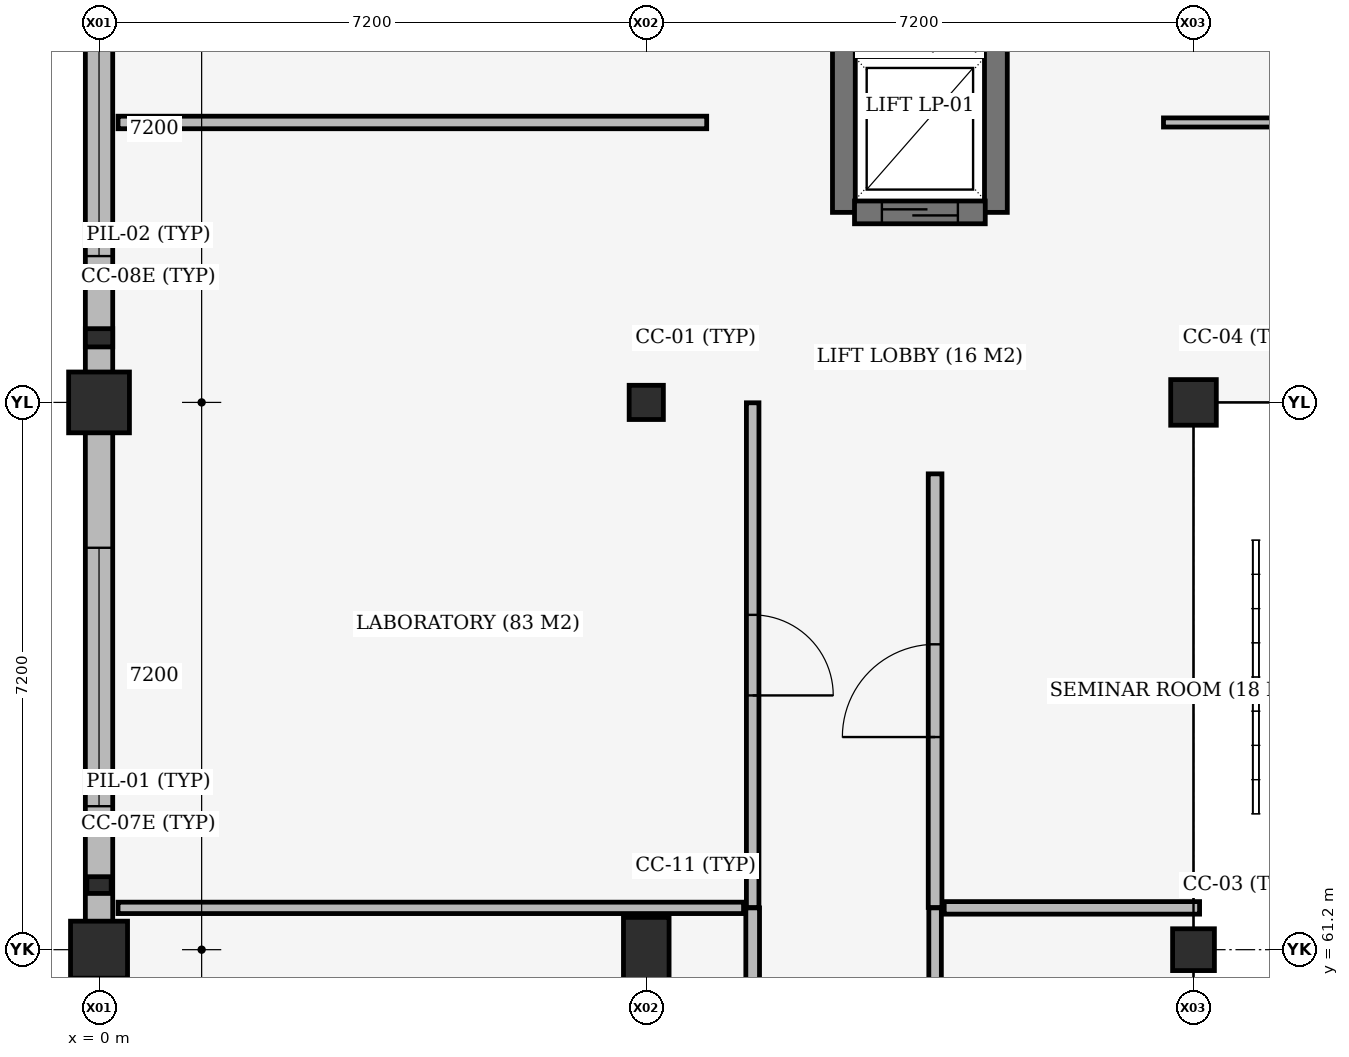
"""IFC4 building model, lengths in metres.
Left out: names, types, materials, properties, quantities, classifications, styles, units other than length and angle.
Written with IfcOpenShell. Run it as: python <this file> out.ifc"""

import sys

from ifc_helpers import new_model, si_unit, direction, frame, frame_2d, origin, origin_2d, place, context, subcontext, project, spatial, rectangle, extrude, element, fill, save


model = new_model("IFC4")
c1 = context("Model", 3, precision=1e-05, world=origin(), true_north=direction((0.0, 1.0)))
c2 = subcontext(c1, "Body", "Model", "MODEL_VIEW")
j1 = project(units=[si_unit("LENGTHUNIT", "METRE"), si_unit("PLANEANGLEUNIT", "RADIAN")], contexts=[c1])
p1 = place(None, origin())
s1 = spatial("IfcSite", under=j1, at=p1, CompositionType="ELEMENT")
p2 = place(p1, origin())
s2 = spatial("IfcBuilding", under=s1, at=p2, CompositionType="ELEMENT")
p3 = place(p2, frame((0.0, 0.0, 5.4)))
s3 = spatial("IfcBuildingStorey", under=s2, at=p3, CompositionType="ELEMENT", Elevation=5.4)
p4 = place(p3, frame((0.0, 61.2, 0.0), z_axis=(0.0, 0.0, 1.0), x_axis=(1.0, 0.0, 0.0)))
e1 = element("IfcColumn", 1, at=p4, inside=s3, PredefinedType="COLUMN", context=c2, shape_type="SweptSolid", body=[
    extrude(rectangle(XDim=0.75, YDim=0.75, at=origin_2d()), origin(), (0.0, 0.0, 1.0), 3.89),
])
p5 = place(p3, frame((0.0, 68.4, 0.0), z_axis=(0.0, 0.0, 1.0), x_axis=(1.0, 0.0, 0.0)))
e2 = element("IfcColumn", 2, at=p5, inside=s3, PredefinedType="COLUMN", context=c2, shape_type="SweptSolid", body=[
    extrude(rectangle(XDim=0.8, YDim=0.8, at=origin_2d()), origin(), (0.0, 0.0, 1.0), 3.89),
])
p6 = place(p3, frame((7.2, 61.2, 0.0), z_axis=(0.0, 0.0, 1.0), x_axis=(1.0, 0.0, 0.0)))
e3 = element("IfcColumn", 3, at=p6, inside=s3, PredefinedType="COLUMN", context=c2, shape_type="SweptSolid", body=[
    extrude(rectangle(XDim=0.6, YDim=0.85, at=origin_2d()), origin(), (0.0, 0.0, 1.0), 3.89),
])
p7 = place(p3, frame((7.2, 68.4, 0.0), z_axis=(0.0, 0.0, 1.0), x_axis=(1.0, 0.0, 0.0)))
e4 = element("IfcColumn", 4, at=p7, inside=s3, PredefinedType="COLUMN", context=c2, shape_type="SweptSolid", body=[
    extrude(rectangle(XDim=0.45, YDim=0.45, at=origin_2d()), origin(), (0.0, 0.0, 1.0), 3.89),
])
p8 = place(p3, frame((14.4, 61.2, 0.0), z_axis=(0.0, 0.0, 1.0), x_axis=(1.0, 0.0, 0.0)))
e5 = element("IfcColumn", 5, at=p8, inside=s3, PredefinedType="COLUMN", context=c2, shape_type="SweptSolid", body=[
    extrude(rectangle(XDim=0.55, YDim=0.55, at=origin_2d()), origin(), (0.0, 0.0, 1.0), 3.89),
])
p9 = place(p3, frame((14.4, 68.4, 0.0), z_axis=(0.0, 0.0, 1.0), x_axis=(1.0, 0.0, 0.0)))
e6 = element("IfcColumn", 6, at=p9, inside=s3, PredefinedType="COLUMN", context=c2, shape_type="SweptSolid", body=[
    extrude(rectangle(XDim=0.6, YDim=0.6, at=origin_2d()), origin(), (0.0, 0.0, 1.0), 3.89),
])
p10 = place(p3, frame((0.0, 62.05, 0.0), z_axis=(0.0, 0.0, 1.0), x_axis=(1.0, 0.0, 0.0)))
e7 = element("IfcColumn", 7, at=p10, inside=s3, PredefinedType="PILASTER", context=c2, shape_type="SweptSolid", body=[
    extrude(rectangle(XDim=0.32, YDim=0.22, at=origin_2d()), origin(), (0.0, 0.0, 1.0), 3.89),
])
p11 = place(p3, frame((0.0, 69.25, 0.0), z_axis=(0.0, 0.0, 1.0), x_axis=(1.0, 0.0, 0.0)))
e8 = element("IfcColumn", 8, at=p11, inside=s3, PredefinedType="PILASTER", context=c2, shape_type="SweptSolid", body=[
    extrude(rectangle(XDim=0.36, YDim=0.24, at=origin_2d()), origin(), (0.0, 0.0, 1.0), 3.89),
])
p12 = place(p3, frame((11.8, 73.1, 0.0), z_axis=(0.0, 0.0, 1.0), x_axis=(-1.0, 0.0, 0.0)))
e9 = element("IfcWall", 9, at=p12, inside=s3, PredefinedType="SHEAR", context=c2, shape_type="SweptSolid", body=[
    extrude(rectangle(XDim=2.0, YDim=0.3, at=frame_2d((1.0, 0.0))), origin(), (0.0, 0.0, 1.0), 3.89),
])
for number, where, z_axis, x_axis in (
    (10, (9.8, 73.1, 0.0), (0.0, 0.0, 1.0), (0.0, -1.0, 0.0)),
    (11, (11.8, 70.9, 0.0), (0.0, 0.0, 1.0), (0.0, 1.0, 0.0)),
):
    element("IfcWall", number, at=place(p3, frame(where, z_axis=z_axis, x_axis=x_axis)), inside=s3, PredefinedType="SHEAR", context=c2, shape_type="SweptSolid", body=[
        extrude(rectangle(XDim=2.2, YDim=0.3, at=frame_2d((1.1, 0.0))), origin(), (0.0, 0.0, 1.0), 3.89),
    ])
p13 = place(p3, frame((0.0, 54.342, 0.0), z_axis=(0.0, 0.0, 1.0), x_axis=(0.0, 1.0, 0.0)))
e12 = element("IfcWall", 12, at=p13, inside=s3, PredefinedType="STANDARD", context=c2, shape_type="SweptSolid", body=[
    extrude(rectangle(XDim=6.491, YDim=0.36, at=frame_2d((3.246, 0.0))), origin(), (0.0, 0.0, 1.0), 3.25),
])
p14 = place(p13, frame((1.545, 0.0, 0.9)))
e13 = element("IfcOpeningElement", 13, at=p14, cuts=e12, PredefinedType="OPENING", context=c2, shape_type="SweptSolid", body=[
    extrude(rectangle(XDim=3.4, YDim=1.5, at=frame_2d((1.7, 0.75))), frame((0.0, 0.19, 0.0), z_axis=(0.0, -1.0, 0.0), x_axis=(1.0, 0.0, 0.0)), (0.0, 0.0, 1.0), 0.38),
])
p15 = place(p3, frame((0.0, 61.567, 0.0), z_axis=(0.0, 0.0, 1.0), x_axis=(0.0, 1.0, 0.0)))
e14 = element("IfcWall", 14, at=p15, inside=s3, PredefinedType="STANDARD", context=c2, shape_type="SweptSolid", body=[
    extrude(rectangle(XDim=6.441, YDim=0.36, at=frame_2d((3.221, 0.0))), origin(), (0.0, 0.0, 1.0), 3.21),
])
p16 = place(p15, frame((1.521, 0.0, 0.9)))
e15 = element("IfcOpeningElement", 15, at=p16, cuts=e14, PredefinedType="OPENING", context=c2, shape_type="SweptSolid", body=[
    extrude(rectangle(XDim=3.4, YDim=1.5, at=frame_2d((1.7, 0.75))), frame((0.0, 0.19, 0.0), z_axis=(0.0, -1.0, 0.0), x_axis=(1.0, 0.0, 0.0)), (0.0, 0.0, 1.0), 0.38),
])
p17 = place(p3, frame((0.0, 68.792, 0.0), z_axis=(0.0, 0.0, 1.0), x_axis=(0.0, 1.0, 0.0)))
e16 = element("IfcWall", 16, at=p17, inside=s3, PredefinedType="STANDARD", context=c2, shape_type="SweptSolid", body=[
    extrude(rectangle(XDim=6.466, YDim=0.36, at=frame_2d((3.233, 0.0))), origin(), (0.0, 0.0, 1.0), 3.15),
])
p18 = place(p17, frame((1.533, 0.0, 0.9)))
e17 = element("IfcOpeningElement", 17, at=p18, cuts=e16, PredefinedType="OPENING", context=c2, shape_type="SweptSolid", body=[
    extrude(rectangle(XDim=3.4, YDim=1.5, at=frame_2d((1.7, 0.75))), frame((0.0, 0.19, 0.0), z_axis=(0.0, -1.0, 0.0), x_axis=(1.0, 0.0, 0.0)), (0.0, 0.0, 1.0), 0.38),
])
p19 = place(p3, frame((11.66, 70.9, 0.0), z_axis=(0.0, 0.0, 1.0), x_axis=(-1.0, 0.0, 0.0)))
e18 = element("IfcWall", 18, at=p19, inside=s3, PredefinedType="SHEAR", context=c2, shape_type="SweptSolid", body=[
    extrude(rectangle(XDim=1.72, YDim=0.3, at=frame_2d((0.86, 0.0))), origin(), (0.0, 0.0, 1.0), 3.89),
])
p20 = place(p19, frame((0.36, 0.0, 0.0)))
e19 = element("IfcOpeningElement", 19, at=p20, cuts=e18, PredefinedType="OPENING", context=c2, shape_type="SweptSolid", body=[
    extrude(rectangle(XDim=1.0, YDim=2.1, at=frame_2d((0.5, 1.05))), frame((0.0, 0.16, 0.0), z_axis=(0.0, -1.0, 0.0), x_axis=(1.0, 0.0, 0.0)), (0.0, 0.0, 1.0), 0.32),
])
p21 = place(p3, frame((8.6, 46.255, 0.0), z_axis=(0.0, 0.0, 1.0), x_axis=(0.0, 1.0, 0.0)))
e20 = element("IfcWall", 20, at=p21, inside=s3, PredefinedType="PARTITIONING", context=c2, shape_type="SweptSolid", body=[
    extrude(rectangle(XDim=15.495, YDim=0.18, at=frame_2d((7.748, 0.0))), origin(), (0.0, 0.0, 1.0), 3.15),
])
p22 = place(p21, frame((4.996, 0.0, 0.0)))
e21 = element("IfcOpeningElement", 21, at=p22, cuts=e20, PredefinedType="OPENING", context=c2, shape_type="SweptSolid", body=[
    extrude(rectangle(XDim=1.22, YDim=2.25, at=frame_2d((0.61, 1.125))), frame((0.0, 0.1, 0.0), z_axis=(0.0, -1.0, 0.0), x_axis=(1.0, 0.0, 0.0)), (0.0, 0.0, 1.0), 0.2),
])
p23 = place(p3, frame((0.25, 61.75, 0.0), z_axis=(0.0, 0.0, 1.0), x_axis=(1.0, 0.0, 0.0)))
e22 = element("IfcWall", 22, at=p23, inside=s3, PredefinedType="PARTITIONING", context=c2, shape_type="SweptSolid", body=[
    extrude(rectangle(XDim=8.23, YDim=0.15, at=frame_2d((4.115, 0.0))), origin(), (0.0, 0.0, 1.0), 3.15),
])
p24 = place(p3, frame((8.6, 61.755, 0.0), z_axis=(0.0, 0.0, 1.0), x_axis=(0.0, 1.0, 0.0)))
e23 = element("IfcWall", 23, at=p24, inside=s3, PredefinedType="PARTITIONING", context=c2, shape_type="SweptSolid", body=[
    extrude(rectangle(XDim=6.64, YDim=0.165, at=frame_2d((3.32, 0.0))), origin(), (0.0, 0.0, 1.0), 3.25),
])
p25 = place(p24, frame((2.79, 0.0, 0.0)))
e24 = element("IfcOpeningElement", 24, at=p25, cuts=e23, PredefinedType="OPENING", context=c2, shape_type="SweptSolid", body=[
    extrude(rectangle(XDim=1.06, YDim=2.2, at=frame_2d((0.53, 1.1))), frame((0.0, 0.093, 0.0), z_axis=(0.0, -1.0, 0.0), x_axis=(1.0, 0.0, 0.0)), (0.0, 0.0, 1.0), 0.185),
])
p26 = place(p3, frame((0.25, 72.083, 0.0), z_axis=(0.0, 0.0, 1.0), x_axis=(1.0, 0.0, 0.0)))
e25 = element("IfcWall", 25, at=p26, inside=s3, PredefinedType="PARTITIONING", context=c2, shape_type="SweptSolid", body=[
    extrude(rectangle(XDim=7.745, YDim=0.165, at=frame_2d((3.873, 0.0))), origin(), (0.0, 0.0, 1.0), 3.37),
])
p27 = place(p3, frame((11.0, 46.255, 0.0), z_axis=(0.0, 0.0, 1.0), x_axis=(0.0, 1.0, 0.0)))
e26 = element("IfcWall", 26, at=p27, inside=s3, PredefinedType="PARTITIONING", context=c2, shape_type="SweptSolid", body=[
    extrude(rectangle(XDim=15.495, YDim=0.165, at=frame_2d((7.748, 0.0))), origin(), (0.0, 0.0, 1.0), 3.15),
])
p28 = place(p27, frame((7.218, 0.0, 0.0)))
e27 = element("IfcOpeningElement", 27, at=p28, cuts=e26, PredefinedType="OPENING", context=c2, shape_type="SweptSolid", body=[
    extrude(rectangle(XDim=1.06, YDim=2.2, at=frame_2d((0.53, 1.1))), frame((0.0, 0.093, 0.0), z_axis=(0.0, -1.0, 0.0), x_axis=(1.0, 0.0, 0.0)), (0.0, 0.0, 1.0), 0.185),
])
p29 = place(p3, frame((11.12, 61.75, 0.0), z_axis=(0.0, 0.0, 1.0), x_axis=(1.0, 0.0, 0.0)))
e28 = element("IfcWall", 28, at=p29, inside=s3, PredefinedType="PARTITIONING", context=c2, shape_type="SweptSolid", body=[
    extrude(rectangle(XDim=3.36, YDim=0.165, at=frame_2d((1.68, 0.0))), origin(), (0.0, 0.0, 1.0), 3.31),
])
p30 = place(p3, frame((11.0, 61.755, 0.0), z_axis=(0.0, 0.0, 1.0), x_axis=(0.0, 1.0, 0.0)))
e29 = element("IfcWall", 29, at=p30, inside=s3, PredefinedType="PARTITIONING", context=c2, shape_type="SweptSolid", body=[
    extrude(rectangle(XDim=5.705, YDim=0.18, at=frame_2d((2.853, 0.0))), origin(), (0.0, 0.0, 1.0), 3.89),
])
p31 = place(p30, frame((2.242, 0.0, 0.0)))
e30 = element("IfcOpeningElement", 30, at=p31, cuts=e29, PredefinedType="OPENING", context=c2, shape_type="SweptSolid", body=[
    extrude(rectangle(XDim=1.22, YDim=2.25, at=frame_2d((0.61, 1.125))), frame((0.0, 0.1, 0.0), z_axis=(0.0, -1.0, 0.0), x_axis=(1.0, 0.0, 0.0)), (0.0, 0.0, 1.0), 0.2),
])
p32 = place(p3, frame((14.005, 72.083, 0.0), z_axis=(0.0, 0.0, 1.0), x_axis=(1.0, 0.0, 0.0)))
e31 = element("IfcWall", 31, at=p32, inside=s3, PredefinedType="PARTITIONING", context=c2, shape_type="SweptSolid", body=[
    extrude(rectangle(XDim=16.075, YDim=0.12, at=frame_2d((8.038, 0.0))), origin(), (0.0, 0.0, 1.0), 3.25),
])
p33 = place(p16, origin())
e32 = element("IfcWindow", 32, at=p33, inside=s3, PartitioningType="DOUBLE_PANEL_VERTICAL", PredefinedType="WINDOW", context=c2, shape_type="SweptSolid", body=[
    extrude(rectangle(XDim=3.4, YDim=1.5, at=frame_2d((1.7, 0.75))), frame((0.0, 0.03, 0.0), z_axis=(0.0, -1.0, 0.0), x_axis=(1.0, 0.0, 0.0)), (0.0, 0.0, 1.0), 0.06),
])
fill(e15, e32)
p34 = place(p18, origin())
e33 = element("IfcWindow", 33, at=p34, inside=s3, PartitioningType="DOUBLE_PANEL_VERTICAL", PredefinedType="WINDOW", context=c2, shape_type="SweptSolid", body=[
    extrude(rectangle(XDim=3.4, YDim=1.5, at=frame_2d((1.7, 0.75))), frame((0.0, 0.03, 0.0), z_axis=(0.0, -1.0, 0.0), x_axis=(1.0, 0.0, 0.0)), (0.0, 0.0, 1.0), 0.06),
])
fill(e17, e33)
p35 = place(p20, origin())
e34 = element("IfcDoor", 34, at=p35, inside=s3, OperationType="SLIDING_TO_LEFT", PredefinedType="DOOR", context=c2, shape_type="SweptSolid", body=[
    extrude(rectangle(XDim=1.0, YDim=2.1, at=frame_2d((0.5, 1.05))), frame((0.0, 0.025, 0.0), z_axis=(0.0, -1.0, 0.0), x_axis=(1.0, 0.0, 0.0)), (0.0, 0.0, 1.0), 0.05),
])
fill(e19, e34)
p36 = place(p25, origin())
e35 = element("IfcDoor", 35, at=p36, inside=s3, OperationType="SINGLE_SWING_RIGHT", PredefinedType="DOOR", context=c2, shape_type="SweptSolid", body=[
    extrude(rectangle(XDim=1.06, YDim=2.2, at=frame_2d((0.53, 1.1))), frame((0.0, 0.025, 0.0), z_axis=(0.0, -1.0, 0.0), x_axis=(1.0, 0.0, 0.0)), (0.0, 0.0, 1.0), 0.05),
])
fill(e24, e35)
p37 = place(p31, origin())
e36 = element("IfcDoor", 36, at=p37, inside=s3, OperationType="SINGLE_SWING_LEFT", PredefinedType="DOOR", context=c2, shape_type="SweptSolid", body=[
    extrude(rectangle(XDim=1.22, YDim=2.25, at=frame_2d((0.61, 1.125))), frame((0.0, 0.025, 0.0), z_axis=(0.0, -1.0, 0.0), x_axis=(1.0, 0.0, 0.0)), (0.0, 0.0, 1.0), 0.05),
])
fill(e30, e36)
save(model, sys.argv[1])
